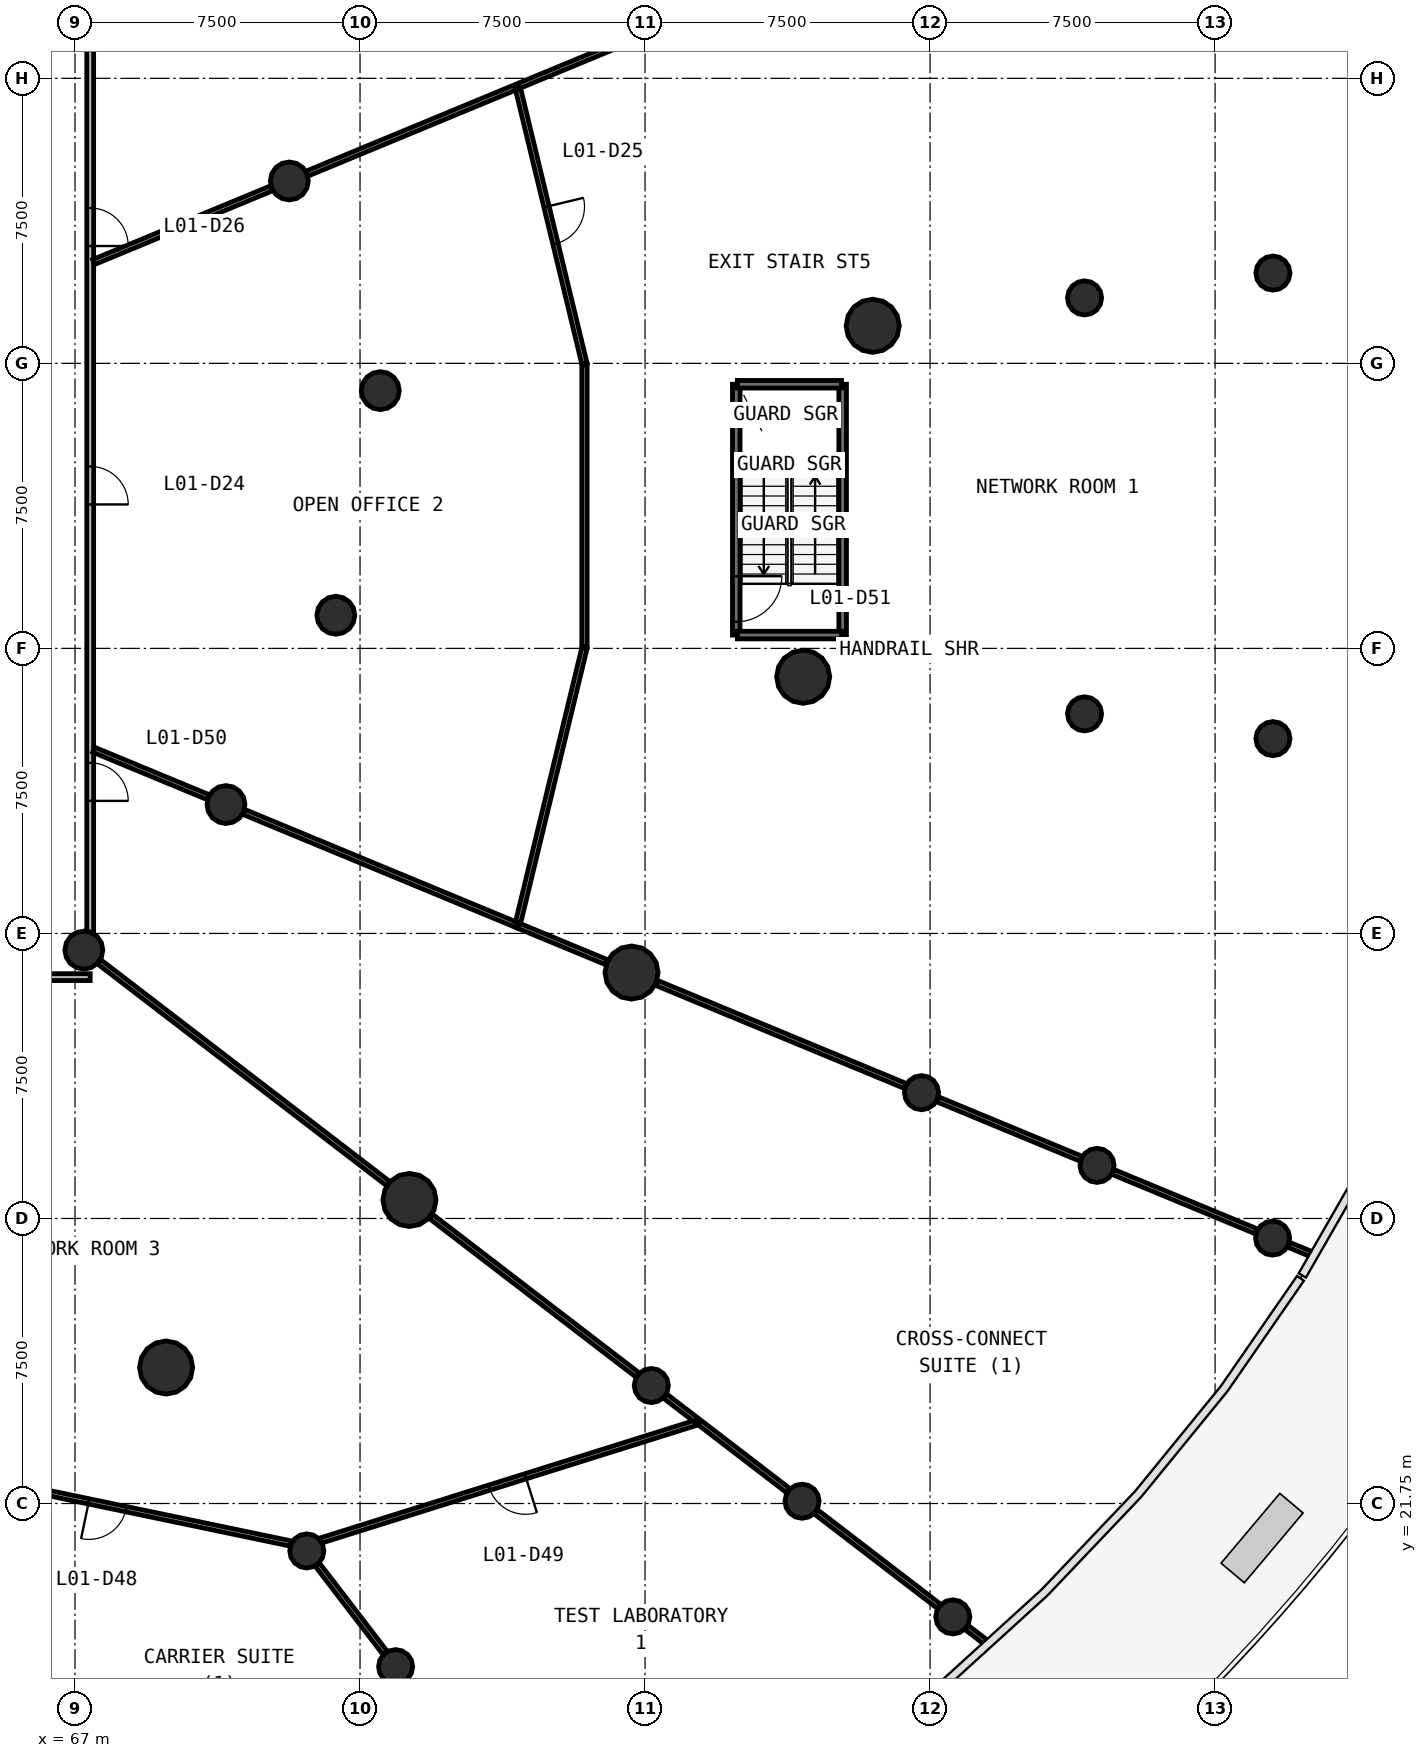
"""IFC4 building model, lengths in metres.
Left out: names, types, materials, properties, quantities, classifications, styles, units other than length and angle.
Written with IfcOpenShell. Run it as: python <this file> out.ifc"""

import sys

from ifc_helpers import new_model, si_unit, direction, frame, frame_2d, origin, origin_2d, place, context, subcontext, project, spatial, rectangle, circle, extrude, source, transform, mapped, element, fill, save


model = new_model("IFC4")
c1 = context("Model", 3, precision=1e-05, world=origin(), true_north=direction((0.0, 1.0)))
c2 = subcontext(c1, "Body", "Model", "MODEL_VIEW")
j1 = project(units=[si_unit("LENGTHUNIT", "METRE"), si_unit("PLANEANGLEUNIT", "RADIAN")], contexts=[c1])
p1 = place(None, origin())
s1 = spatial("IfcSite", under=j1, at=p1, CompositionType="ELEMENT")
p2 = place(p1, origin())
s2 = spatial("IfcBuilding", under=s1, at=p2, CompositionType="ELEMENT")
p3 = place(p2, frame((0.0, 0.0, 5.0)))
s3 = spatial("IfcBuildingStorey", under=s2, at=p3, CompositionType="ELEMENT", Elevation=5.0)
m1 = source(origin(), c2, "Body", "SweptSolid", [
    extrude(circle(Radius=0.7, at=origin_2d()), origin(), (0.0, 0.0, 1.0), 4.4),
])
for number, where, z_axis, x_axis in (
    (1, (87.99, 52.738, 0.0), (0.0, 0.0, 1.0), (1.0, 0.0, 0.0)),
    (2, (69.396, 25.328, 0.0), (0.0, 0.0, 1.0), (1.0, 0.0, 0.0)),
    (3, (75.801, 29.737, 0.0), (0.0, 0.0, 1.0), (1.0, 0.0, 0.0)),
    (4, (81.645, 35.721, 0.0), (0.0, 0.0, 1.0), (1.0, 0.0, 0.0)),
    (5, (86.161, 43.503, 0.0), (0.0, 0.0, 1.0), (1.0, 0.0, 0.0)),
):
    element("IfcColumn", number, at=place(p3, frame(where, z_axis=z_axis, x_axis=x_axis)), inside=s3, PredefinedType="COLUMN", context=c2, shape_type="MappedRepresentation", body=[
        mapped(m1, transform((0.0, 0.0, 0.0), scale=1.0)),
    ])
m2 = source(origin(), c2, "Body", "SweptSolid", [
    extrude(circle(Radius=0.5, at=origin_2d()), origin(), (0.0, 0.0, 1.0), 4.4),
])
for number, where, z_axis, x_axis in (
    (6, (75.034, 51.032, 0.0), (0.0, 0.0, 1.0), (1.0, 0.0, 0.0)),
    (7, (72.639, 56.549, 0.0), (0.0, 0.0, 1.0), (1.0, 0.0, 0.0)),
    (8, (67.232, 36.312, 0.0), (0.0, 0.0, 1.0), (1.0, 0.0, 0.0)),
    (9, (70.972, 40.141, 0.0), (0.0, 0.0, 1.0), (1.0, 0.0, 0.0)),
    (10, (73.863, 45.122, 0.0), (0.0, 0.0, 1.0), (1.0, 0.0, 0.0)),
):
    element("IfcColumn", number, at=place(p3, frame(where, z_axis=z_axis, x_axis=x_axis)), inside=s3, PredefinedType="COLUMN", context=c2, shape_type="MappedRepresentation", body=[
        mapped(m2, transform((0.0, 0.0, 0.0), scale=1.0)),
    ])
m3 = source(origin(), c2, "Body", "SweptSolid", [
    extrude(circle(Radius=0.45, at=origin_2d()), origin(), (0.0, 0.0, 1.0), 4.05),
])
for number, where, z_axis, x_axis in (
    (11, (90.098, 18.767, 0.0), (0.0, 0.0, 1.0), (1.0, 0.0, 0.0)),
    (12, (98.513, 28.734, 0.0), (0.0, 0.0, 1.0), (1.0, 0.0, 0.0)),
):
    element("IfcColumn", number, at=place(p3, frame(where, z_axis=z_axis, x_axis=x_axis)), inside=s3, PredefinedType="COLUMN", context=c2, shape_type="MappedRepresentation", body=[
        mapped(m3, transform((0.0, 0.0, 0.0), scale=1.0)),
    ])
m4 = source(origin(), c2, "Body", "SweptSolid", [
    extrude(circle(Radius=0.45, at=origin_2d()), origin(), (0.0, 0.0, 1.0), 4.4),
])
for number, where, z_axis, x_axis in (
    (13, (98.522, 54.125, 0.0), (0.0, 0.0, 1.0), (1.0, 0.0, 0.0)),
    (14, (75.436, 17.457, 0.0), (0.0, 0.0, 1.0), (1.0, 0.0, 0.0)),
    (15, (86.131, 21.81, 0.0), (0.0, 0.0, 1.0), (1.0, 0.0, 0.0)),
    (16, (93.894, 30.647, 0.0), (0.0, 0.0, 1.0), (1.0, 0.0, 0.0)),
    (17, (98.522, 41.875, 0.0), (0.0, 0.0, 1.0), (1.0, 0.0, 0.0)),
    (18, (93.565, 53.472, 0.0), (0.0, 0.0, 1.0), (1.0, 0.0, 0.0)),
    (19, (73.1, 20.503, 0.0), (0.0, 0.0, 1.0), (1.0, 0.0, 0.0)),
    (20, (82.165, 24.854, 0.0), (0.0, 0.0, 1.0), (1.0, 0.0, 0.0)),
    (21, (89.275, 32.56, 0.0), (0.0, 0.0, 1.0), (1.0, 0.0, 0.0)),
    (22, (93.565, 42.528, 0.0), (0.0, 0.0, 1.0), (1.0, 0.0, 0.0)),
):
    element("IfcColumn", number, at=place(p3, frame(where, z_axis=z_axis, x_axis=x_axis)), inside=s3, PredefinedType="COLUMN", context=c2, shape_type="MappedRepresentation", body=[
        mapped(m4, transform((0.0, 0.0, 0.0), scale=1.0)),
    ])
p4 = place(p3, frame((87.2, 44.6, 0.0), z_axis=(0.0, 0.0, 1.0), x_axis=(0.0, 1.0, 0.0)))
e23 = element("IfcWall", 23, at=p4, inside=s3, PredefinedType="SOLIDWALL", context=c2, shape_type="SweptSolid", body=[
    extrude(rectangle(XDim=6.6, YDim=0.2, at=frame_2d((3.3, 0.0))), origin(), (0.0, 0.0, 1.0), 4.05),
])
p5 = place(p3, frame((84.4, 51.2, 0.0), z_axis=(0.0, 0.0, 1.0), x_axis=(0.0, -1.0, 0.0)))
e24 = element("IfcWall", 24, at=p5, inside=s3, PredefinedType="SOLIDWALL", context=c2, shape_type="SweptSolid", body=[
    extrude(rectangle(XDim=6.6, YDim=0.2, at=frame_2d((3.3, 0.0))), origin(), (0.0, 0.0, 1.0), 4.05),
])
p6 = place(p5, frame((5.05, 0.0, 0.0)))
e25 = element("IfcOpeningElement", 25, at=p6, cuts=e24, PredefinedType="OPENING", context=c2, shape_type="SweptSolid", body=[
    extrude(rectangle(XDim=1.2, YDim=2.1, at=frame_2d((0.6, 1.05))), frame((0.0, 0.11, 0.0), z_axis=(0.0, -1.0, 0.0), x_axis=(1.0, 0.0, 0.0)), (0.0, 0.0, 1.0), 0.22),
])
for number, where, z_axis, x_axis in (
    (26, (84.43, 44.6, 0.0), (0.0, 0.0, 1.0), (1.0, 0.0, 0.0)),
    (27, (87.17, 51.2, 0.0), (0.0, 0.0, 1.0), (-1.0, 0.0, 0.0)),
):
    element("IfcWall", number, at=place(p3, frame(where, z_axis=z_axis, x_axis=x_axis)), inside=s3, PredefinedType="SOLIDWALL", context=c2, shape_type="SweptSolid", body=[
        extrude(rectangle(XDim=2.74, YDim=0.2, at=frame_2d((1.37, 0.0))), origin(), (0.0, 0.0, 1.0), 4.05),
    ])
p7 = place(p3, frame((67.4, 35.6, 0.0), z_axis=(0.0, 0.0, 1.0), x_axis=(-1.0, 0.0, 0.0)))
e28 = element("IfcWall", 28, at=p7, inside=s3, PredefinedType="PARTITIONING", context=c2, shape_type="SweptSolid", body=[
    extrude(rectangle(XDim=30.8, YDim=0.18, at=frame_2d((15.4, 0.0))), origin(), (0.0, 0.0, 1.0), 3.25),
])
p8 = place(p7, frame((17.35, 0.0, 0.0)))
e29 = element("IfcOpeningElement", 29, at=p8, cuts=e28, PredefinedType="OPENING", context=c2, shape_type="SweptSolid", body=[
    extrude(rectangle(XDim=1.0, YDim=2.1, at=frame_2d((0.5, 1.05))), frame((0.0, 0.1, 0.0), z_axis=(0.0, -1.0, 0.0), x_axis=(1.0, 0.0, 0.0)), (0.0, 0.0, 1.0), 0.2),
])
p9 = place(p7, frame((14.95, 0.0, 0.0)))
e30 = element("IfcOpeningElement", 30, at=p9, cuts=e28, PredefinedType="OPENING", context=c2, shape_type="SweptSolid", body=[
    extrude(rectangle(XDim=1.0, YDim=2.1, at=frame_2d((0.5, 1.05))), frame((0.0, 0.1, 0.0), z_axis=(0.0, -1.0, 0.0), x_axis=(1.0, 0.0, 0.0)), (0.0, 0.0, 1.0), 0.2),
])
p10 = place(p7, frame((8.95, 0.0, 0.0)))
e31 = element("IfcOpeningElement", 31, at=p10, cuts=e28, PredefinedType="OPENING", context=c2, shape_type="SweptSolid", body=[
    extrude(rectangle(XDim=1.0, YDim=2.1, at=frame_2d((0.5, 1.05))), frame((0.0, 0.1, 0.0), z_axis=(0.0, -1.0, 0.0), x_axis=(1.0, 0.0, 0.0)), (0.0, 0.0, 1.0), 0.2),
])
p11 = place(p3, frame((67.4, 60.37, 0.0), z_axis=(0.0, 0.0, 1.0), x_axis=(0.0, -1.0, 0.0)))
e32 = element("IfcWall", 32, at=p11, inside=s3, PredefinedType="PARTITIONING", context=c2, shape_type="SweptSolid", body=[
    extrude(rectangle(XDim=23.583, YDim=0.18, at=frame_2d((11.791, 0.0))), origin(), (0.0, 0.0, 1.0), 3.25),
])
p12 = place(p11, frame((11.333, 0.0, 0.0)))
e33 = element("IfcOpeningElement", 33, at=p12, cuts=e32, PredefinedType="OPENING", context=c2, shape_type="SweptSolid", body=[
    extrude(rectangle(XDim=1.0, YDim=2.1, at=frame_2d((0.5, 1.05))), frame((0.0, 0.1, 0.0), z_axis=(0.0, -1.0, 0.0), x_axis=(1.0, 0.0, 0.0)), (0.0, 0.0, 1.0), 0.2),
])
p13 = place(p11, frame((4.532, 0.0, 0.0)))
e34 = element("IfcOpeningElement", 34, at=p13, cuts=e32, PredefinedType="OPENING", context=c2, shape_type="SweptSolid", body=[
    extrude(rectangle(XDim=1.0, YDim=2.1, at=frame_2d((0.5, 1.05))), frame((0.0, 0.1, 0.0), z_axis=(0.0, -1.0, 0.0), x_axis=(1.0, 0.0, 0.0)), (0.0, 0.0, 1.0), 0.2),
])
p14 = place(p11, frame((19.133, 0.0, 0.0)))
e35 = element("IfcOpeningElement", 35, at=p14, cuts=e32, PredefinedType="OPENING", context=c2, shape_type="SweptSolid", body=[
    extrude(rectangle(XDim=1.0, YDim=2.1, at=frame_2d((0.5, 1.05))), frame((0.0, 0.1, 0.0), z_axis=(0.0, -1.0, 0.0), x_axis=(1.0, 0.0, 0.0)), (0.0, 0.0, 1.0), 0.2),
])
p15 = place(p3, frame((83.412, 23.896, 0.0), z_axis=(0.0, 0.0, 1.0), x_axis=(-0.954121832826, -0.299418650262, 0.0)))
e36 = element("IfcWall", 36, at=p15, inside=s3, PredefinedType="PARTITIONING", context=c2, shape_type="SweptSolid", body=[
    extrude(rectangle(XDim=10.427, YDim=0.14, at=frame_2d((5.213, 0.0))), origin(), (0.0, 0.0, 1.0), 3.25),
])
p16 = place(p15, frame((4.777, 0.0, 0.0)))
e37 = element("IfcOpeningElement", 37, at=p16, cuts=e36, PredefinedType="OPENING", context=c2, shape_type="SweptSolid", body=[
    extrude(rectangle(XDim=1.0, YDim=2.1, at=frame_2d((0.5, 1.05))), frame((0.0, 0.08, 0.0), z_axis=(0.0, -1.0, 0.0), x_axis=(1.0, 0.0, 0.0)), (0.0, 0.0, 1.0), 0.16),
])
p17 = place(p3, frame((72.688, 20.695, 0.0), z_axis=(0.0, 0.0, 1.0), x_axis=(-0.978931754846, 0.204187706176, 0.0)))
e38 = element("IfcWall", 38, at=p17, inside=s3, PredefinedType="PARTITIONING", context=c2, shape_type="SweptSolid", body=[
    extrude(rectangle(XDim=9.688, YDim=0.14, at=frame_2d((4.844, 0.0))), origin(), (0.0, 0.0, 1.0), 3.25),
])
p18 = place(p17, frame((4.438, 0.0, 0.0)))
e39 = element("IfcOpeningElement", 39, at=p18, cuts=e38, PredefinedType="OPENING", context=c2, shape_type="SweptSolid", body=[
    extrude(rectangle(XDim=1.0, YDim=2.1, at=frame_2d((0.5, 1.05))), frame((0.0, 0.08, 0.0), z_axis=(0.0, -1.0, 0.0), x_axis=(1.0, 0.0, 0.0)), (0.0, 0.0, 1.0), 0.16),
])
p19 = place(p3, frame((67.633, 36.005, 0.0), z_axis=(0.0, 0.0, 1.0), x_axis=(0.793366218398, -0.608744645566, 0.0)))
e40 = element("IfcWall", 40, at=p19, inside=s3, PredefinedType="PARTITIONING", context=c2, shape_type="SweptSolid", body=[
    extrude(rectangle(XDim=9.591, YDim=0.14, at=frame_2d((4.796, 0.0))), origin(), (0.0, 0.0, 1.0), 3.25),
])
p20 = place(p3, frame((71.439, 39.948, 0.0), z_axis=(0.0, 0.0, 1.0), x_axis=(0.923876369205, -0.382691069173, 0.0)))
e41 = element("IfcWall", 41, at=p20, inside=s3, PredefinedType="PARTITIONING", context=c2, shape_type="SweptSolid", body=[
    extrude(rectangle(XDim=7.796, YDim=0.14, at=frame_2d((3.898, 0.0))), origin(), (0.0, 0.0, 1.0), 3.25),
])
p21 = place(p3, frame((78.642, 59.035, 0.0), z_axis=(0.0, 0.0, 1.0), x_axis=(0.235066566732, -0.971979274061, 0.0)))
e42 = element("IfcWall", 42, at=p21, inside=s3, PredefinedType="PARTITIONING", context=c2, shape_type="SweptSolid", body=[
    extrude(rectangle(XDim=7.506, YDim=0.14, at=frame_2d((3.753, 0.0))), origin(), (0.0, 0.0, 1.0), 3.25),
])
p22 = place(p21, frame((3.256, 0.0, 0.0)))
e43 = element("IfcOpeningElement", 43, at=p22, cuts=e42, PredefinedType="OPENING", context=c2, shape_type="SweptSolid", body=[
    extrude(rectangle(XDim=1.0, YDim=2.1, at=frame_2d((0.5, 1.05))), frame((0.0, 0.08, 0.0), z_axis=(0.0, -1.0, 0.0), x_axis=(1.0, 0.0, 0.0)), (0.0, 0.0, 1.0), 0.16),
])
p23 = place(p3, frame((78.658, 37.034, 0.0), z_axis=(0.0, 0.0, 1.0), x_axis=(0.235080266969, 0.97197596065, 0.0)))
e44 = element("IfcWall", 44, at=p23, inside=s3, PredefinedType="PARTITIONING", context=c2, shape_type="SweptSolid", body=[
    extrude(rectangle(XDim=7.435, YDim=0.14, at=frame_2d((3.717, 0.0))), origin(), (0.0, 0.0, 1.0), 3.25),
])
p24 = place(p3, frame((80.406, 44.29, 0.0), z_axis=(0.0, 0.0, 1.0), x_axis=(0.0, 1.0, 0.0)))
e45 = element("IfcWall", 45, at=p24, inside=s3, PredefinedType="PARTITIONING", context=c2, shape_type="SweptSolid", body=[
    extrude(rectangle(XDim=7.419, YDim=0.14, at=frame_2d((3.71, 0.0))), origin(), (0.0, 0.0, 1.0), 3.25),
])
p25 = place(p3, frame((82.296, 35.451, 0.0), z_axis=(0.0, 0.0, 1.0), x_axis=(0.923879762642, -0.382682876779, 0.0)))
e46 = element("IfcWall", 46, at=p25, inside=s3, PredefinedType="PARTITIONING", context=c2, shape_type="SweptSolid", body=[
    extrude(rectangle(XDim=7.099, YDim=0.14, at=frame_2d((3.549, 0.0))), origin(), (0.0, 0.0, 1.0), 3.25),
])
p26 = place(p3, frame((76.359, 29.309, 0.0), z_axis=(0.0, 0.0, 1.0), x_axis=(0.793338893585, -0.60878025586, 0.0)))
e47 = element("IfcWall", 47, at=p26, inside=s3, PredefinedType="PARTITIONING", context=c2, shape_type="SweptSolid", body=[
    extrude(rectangle(XDim=6.863, YDim=0.14, at=frame_2d((3.431, 0.0))), origin(), (0.0, 0.0, 1.0), 3.25),
])
p27 = place(p3, frame((73.106, 56.742, 0.0), z_axis=(0.0, 0.0, 1.0), x_axis=(0.923863045068, 0.382723234148, 0.0)))
e48 = element("IfcWall", 48, at=p27, inside=s3, PredefinedType="PARTITIONING", context=c2, shape_type="SweptSolid", body=[
    extrude(rectangle(XDim=5.921, YDim=0.14, at=frame_2d((2.96, 0.0))), origin(), (0.0, 0.0, 1.0), 3.25),
])
p28 = place(p3, frame((78.669, 59.047, 0.0), z_axis=(0.0, 0.0, 1.0), x_axis=(0.923891330959, 0.382654947151, 0.0)))
e49 = element("IfcWall", 49, at=p28, inside=s3, PredefinedType="PARTITIONING", context=c2, shape_type="SweptSolid", body=[
    extrude(rectangle(XDim=5.334, YDim=0.14, at=frame_2d((2.667, 0.0))), origin(), (0.0, 0.0, 1.0), 3.25),
])
p29 = place(p3, frame((67.49, 54.416, 0.0), z_axis=(0.0, 0.0, 1.0), x_axis=(0.923890025086, 0.382658100067, 0.0)))
e50 = element("IfcWall", 50, at=p29, inside=s3, PredefinedType="PARTITIONING", context=c2, shape_type="SweptSolid", body=[
    extrude(rectangle(XDim=5.068, YDim=0.14, at=frame_2d((2.534, 0.0))), origin(), (0.0, 0.0, 1.0), 3.25),
])
p30 = place(p3, frame((86.492, 21.533, 0.0), z_axis=(0.0, 0.0, 1.0), x_axis=(0.793355578527, -0.608758512072, 0.0)))
e51 = element("IfcWall", 51, at=p30, inside=s3, PredefinedType="PARTITIONING", context=c2, shape_type="SweptSolid", body=[
    extrude(rectangle(XDim=4.091, YDim=0.14, at=frame_2d((2.045, 0.0))), origin(), (0.0, 0.0, 1.0), 3.25),
])
p31 = place(p3, frame((94.314, 30.473, 0.0), z_axis=(0.0, 0.0, 1.0), x_axis=(0.923874959136, -0.382694473284, 0.0)))
e52 = element("IfcWall", 52, at=p31, inside=s3, PredefinedType="PARTITIONING", context=c2, shape_type="SweptSolid", body=[
    extrude(rectangle(XDim=4.09, YDim=0.14, at=frame_2d((2.045, 0.0))), origin(), (0.0, 0.0, 1.0), 3.25),
])
p32 = place(p3, frame((89.695, 32.386, 0.0), z_axis=(0.0, 0.0, 1.0), x_axis=(0.92386621601, -0.382715579661, 0.0)))
e53 = element("IfcWall", 53, at=p32, inside=s3, PredefinedType="PARTITIONING", context=c2, shape_type="SweptSolid", body=[
    extrude(rectangle(XDim=4.09, YDim=0.14, at=frame_2d((2.045, 0.0))), origin(), (0.0, 0.0, 1.0), 3.25),
])
p33 = place(p3, frame((67.49, 41.584, 0.0), z_axis=(0.0, 0.0, 1.0), x_axis=(0.923911109142, -0.382607190737, 0.0)))
e54 = element("IfcWall", 54, at=p33, inside=s3, PredefinedType="PARTITIONING", context=c2, shape_type="SweptSolid", body=[
    extrude(rectangle(XDim=3.264, YDim=0.14, at=frame_2d((1.632, 0.0))), origin(), (0.0, 0.0, 1.0), 3.25),
])
p34 = place(p3, frame((83.436, 23.878, 0.0), z_axis=(0.0, 0.0, 1.0), x_axis=(0.793360579515, -0.608751994552, 0.0)))
e55 = element("IfcWall", 55, at=p34, inside=s3, PredefinedType="PARTITIONING", context=c2, shape_type="SweptSolid", body=[
    extrude(rectangle(XDim=2.943, YDim=0.14, at=frame_2d((1.471, 0.0))), origin(), (0.0, 0.0, 1.0), 3.25),
])
p35 = place(p3, frame((73.376, 20.142, 0.0), z_axis=(0.0, 0.0, 1.0), x_axis=(0.608763898154, -0.793351445643, 0.0)))
e56 = element("IfcWall", 56, at=p35, inside=s3, PredefinedType="PARTITIONING", context=c2, shape_type="SweptSolid", body=[
    extrude(rectangle(XDim=2.93, YDim=0.14, at=frame_2d((1.465, 0.0))), origin(), (0.0, 0.0, 1.0), 3.25),
])
p36 = place(p3, frame((78.669, 36.953, 0.0), z_axis=(0.0, 0.0, 1.0), x_axis=(0.923876063287, -0.382691807705, 0.0)))
e57 = element("IfcWall", 57, at=p36, inside=s3, PredefinedType="PARTITIONING", context=c2, shape_type="SweptSolid", body=[
    extrude(rectangle(XDim=2.515, YDim=0.14, at=frame_2d((1.258, 0.0))), origin(), (0.0, 0.0, 1.0), 3.25),
])
p37 = place(p3, frame((82.525, 24.577, 0.0), z_axis=(0.0, 0.0, 1.0), x_axis=(0.793370394363, -0.608739203065, 0.0)))
e58 = element("IfcWall", 58, at=p37, inside=s3, PredefinedType="PARTITIONING", context=c2, shape_type="SweptSolid", body=[
    extrude(rectangle(XDim=1.033, YDim=0.14, at=frame_2d((0.516, 0.0))), origin(), (0.0, 0.0, 1.0), 3.25),
])
for number, where, z_axis, x_axis in (
    (59, (98.934, 28.56, 0.0), (0.0, 0.0, 1.0), (0.924, -0.383, 0.0)),
    (60, (90.458, 18.49, 0.0), (0.0, 0.0, 1.0), (0.793, -0.609, 0.0)),
):
    element("IfcWall", number, at=place(p3, frame(where, z_axis=z_axis, x_axis=x_axis)), inside=s3, PredefinedType="PARTITIONING", context=c2, shape_type="SweptSolid", body=[
        extrude(rectangle(XDim=0.634, YDim=0.14, at=frame_2d((0.317, 0.0))), origin(), (0.0, 0.0, 1.0), 3.25),
    ])
m5 = source(origin(), c2, "Body", "SweptSolid", [
    extrude(rectangle(XDim=1.0, YDim=2.1, at=frame_2d((0.5, 1.05))), frame((0.0, 0.025, 0.0), z_axis=(0.0, -1.0, 0.0), x_axis=(1.0, 0.0, 0.0)), (0.0, 0.0, 1.0), 0.05),
])
p38 = place(p12, origin())
e61 = element("IfcDoor", 61, at=p38, inside=s3, OperationType="SINGLE_SWING_RIGHT", PredefinedType="DOOR", context=c2, shape_type="MappedRepresentation", body=[
    mapped(m5, transform((0.0, 0.0, 0.0), scale=1.0)),
])
fill(e33, e61)
p39 = place(p22, origin())
e62 = element("IfcDoor", 62, at=p39, inside=s3, OperationType="SINGLE_SWING_LEFT", PredefinedType="DOOR", context=c2, shape_type="MappedRepresentation", body=[
    mapped(m5, transform((0.0, 0.0, 0.0), scale=1.0)),
])
fill(e43, e62)
p40 = place(p13, origin())
e63 = element("IfcDoor", 63, at=p40, inside=s3, OperationType="SINGLE_SWING_RIGHT", PredefinedType="DOOR", context=c2, shape_type="MappedRepresentation", body=[
    mapped(m5, transform((0.0, 0.0, 0.0), scale=1.0)),
])
fill(e34, e63)
p41 = place(p18, origin())
e64 = element("IfcDoor", 64, at=p41, inside=s3, OperationType="SINGLE_SWING_RIGHT", PredefinedType="DOOR", context=c2, shape_type="MappedRepresentation", body=[
    mapped(m5, transform((0.0, 0.0, 0.0), scale=1.0)),
])
fill(e39, e64)
p42 = place(p16, origin())
e65 = element("IfcDoor", 65, at=p42, inside=s3, OperationType="SINGLE_SWING_LEFT", PredefinedType="DOOR", context=c2, shape_type="MappedRepresentation", body=[
    mapped(m5, transform((0.0, 0.0, 0.0), scale=1.0)),
])
fill(e37, e65)
p43 = place(p14, origin())
e66 = element("IfcDoor", 66, at=p43, inside=s3, OperationType="SINGLE_SWING_RIGHT", PredefinedType="DOOR", context=c2, shape_type="MappedRepresentation", body=[
    mapped(m5, transform((0.0, 0.0, 0.0), scale=1.0)),
])
fill(e35, e66)
m6 = source(origin(), c2, "Body", "SweptSolid", [
    extrude(rectangle(XDim=1.2, YDim=2.1, at=frame_2d((0.6, 1.05))), frame((0.0, 0.025, 0.0), z_axis=(0.0, -1.0, 0.0), x_axis=(1.0, 0.0, 0.0)), (0.0, 0.0, 1.0), 0.05),
])
p44 = place(p6, origin())
e67 = element("IfcDoor", 67, at=p44, inside=s3, OperationType="SINGLE_SWING_LEFT", PredefinedType="DOOR", context=c2, shape_type="MappedRepresentation", body=[
    mapped(m6, transform((0.0, 0.0, 0.0), scale=1.0)),
])
fill(e25, e67)
save(model, sys.argv[1])
